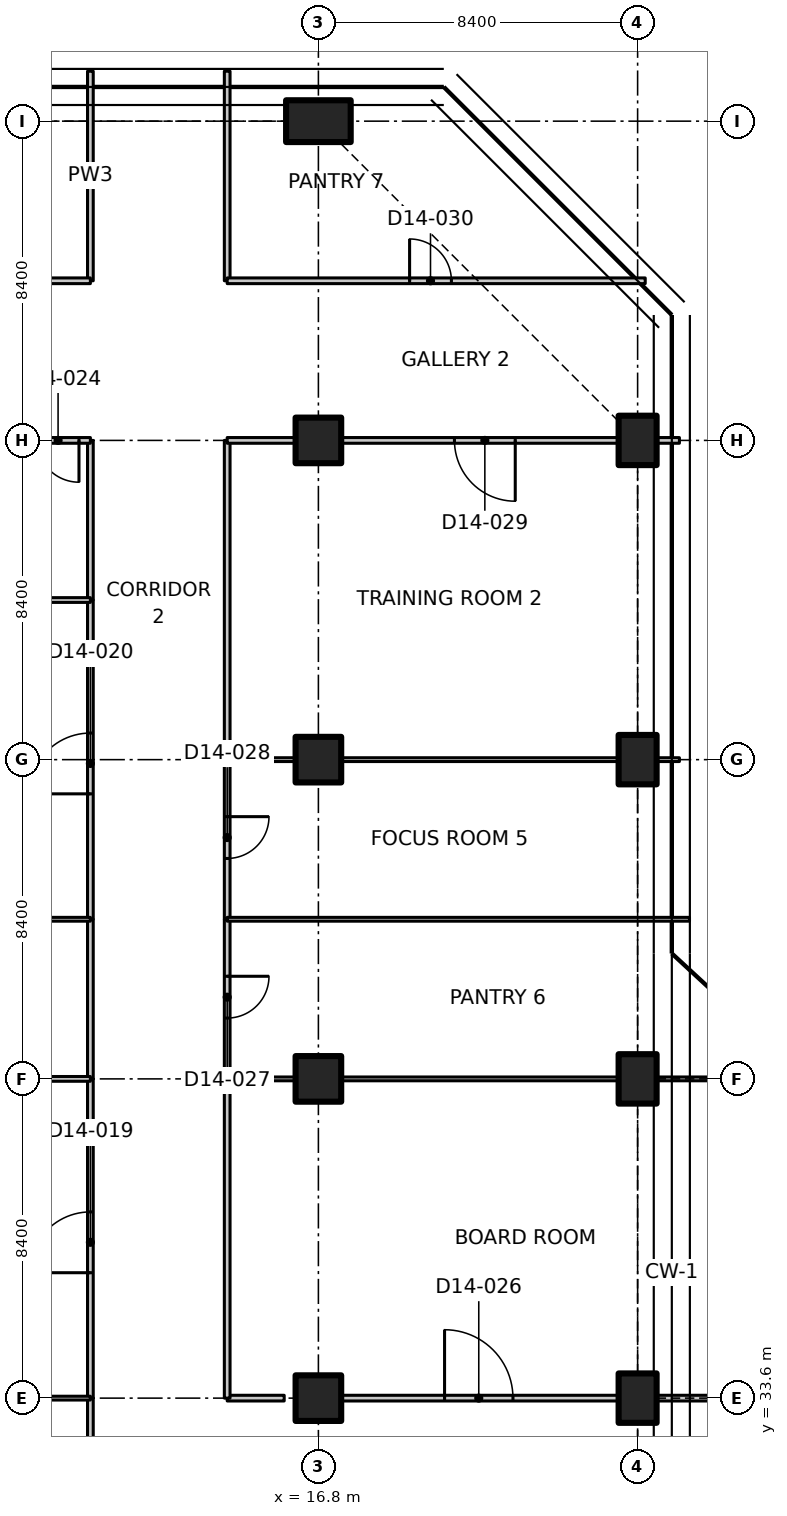
"""IFC4 building model, lengths in metres.
Left out: names, types, materials, properties, quantities, classifications, styles, units other than length and angle.
Written with IfcOpenShell. Run it as: python <this file> out.ifc"""

import sys

from ifc_helpers import new_model, si_unit, direction, frame, frame_2d, origin, origin_2d, place, context, subcontext, project, spatial, polyline, rectangle, outline, extrude, element, fill, save


model = new_model("IFC4")
c1 = context("Model", 3, precision=1e-05, world=origin(), true_north=direction((0.0, 1.0)))
c2 = subcontext(c1, "Body", "Model", "MODEL_VIEW")
j1 = project(units=[si_unit("LENGTHUNIT", "METRE"), si_unit("PLANEANGLEUNIT", "RADIAN")], contexts=[c1])
p1 = place(None, origin())
s1 = spatial("IfcSite", under=j1, at=p1, CompositionType="ELEMENT")
p2 = place(p1, origin())
s2 = spatial("IfcBuilding", under=s1, at=p2, CompositionType="ELEMENT")
p3 = place(p2, frame((0.0, 0.0, 106.1)))
s3 = spatial("IfcBuildingStorey", under=s2, at=p3, CompositionType="ELEMENT", Elevation=106.1)
for number, where, z_axis, x_axis in (
    (1, (16.8, 33.6, 0.0), (0.0, 0.0, 1.0), (1.0, 0.0, 0.0)),
    (2, (16.8, 42.0, 0.0), (0.0, 0.0, 1.0), (1.0, 0.0, 0.0)),
    (3, (16.8, 50.4, 0.0), (0.0, 0.0, 1.0), (1.0, 0.0, 0.0)),
    (4, (16.8, 58.8, 0.0), (0.0, 0.0, 1.0), (1.0, 0.0, 0.0)),
):
    element("IfcColumn", number, at=place(p3, frame(where, z_axis=z_axis, x_axis=x_axis)), inside=s3, PredefinedType="COLUMN", context=c2, shape_type="SweptSolid", body=[
        extrude(rectangle(XDim=1.2, YDim=1.2, at=origin_2d()), origin(), (0.0, 0.0, 1.0), 3.35),
    ])
p4 = place(p3, frame((16.8, 67.2, 0.0), z_axis=(0.0, 0.0, 1.0), x_axis=(0.0, 1.0, 0.0)))
e5 = element("IfcColumn", 5, at=p4, inside=s3, PredefinedType="COLUMN", context=c2, shape_type="SweptSolid", body=[
    extrude(rectangle(XDim=1.1, YDim=1.7, at=origin_2d()), origin(), (0.0, 0.0, 1.0), 3.35),
])
for number, where, z_axis, x_axis in (
    (6, (25.2, 33.6, 0.0), (0.0, 0.0, 1.0), (1.0, 0.0, 0.0)),
    (7, (25.2, 42.0, 0.0), (0.0, 0.0, 1.0), (1.0, 0.0, 0.0)),
    (8, (25.2, 50.4, 0.0), (0.0, 0.0, 1.0), (1.0, 0.0, 0.0)),
    (9, (25.2, 58.8, 0.0), (0.0, 0.0, 1.0), (1.0, 0.0, 0.0)),
):
    element("IfcColumn", number, at=place(p3, frame(where, z_axis=z_axis, x_axis=x_axis)), inside=s3, PredefinedType="COLUMN", context=c2, shape_type="SweptSolid", body=[
        extrude(rectangle(XDim=1.0, YDim=1.3, at=origin_2d()), origin(), (0.0, 0.0, 1.0), 3.35),
    ])
p5 = place(p3, frame((10.8, 25.2, 0.0), z_axis=(0.0, 0.0, 1.0), x_axis=(0.0, 1.0, 0.0)))
e10 = element("IfcWall", 10, at=p5, inside=s3, PredefinedType="PARTITIONING", context=c2, shape_type="SweptSolid", body=[
    extrude(rectangle(XDim=8.4, YDim=0.15, at=frame_2d((4.2, 0.0))), origin(), (0.0, 0.0, 1.0), 3.33),
])
p6 = place(p5, frame((3.3, 0.0, 0.0)))
e11 = element("IfcOpeningElement", 11, at=p6, cuts=e10, PredefinedType="OPENING", context=c2, shape_type="SweptSolid", body=[
    extrude(rectangle(XDim=1.6, YDim=2.1, at=frame_2d((0.8, 1.05))), frame((0.0, 0.085, 0.0), z_axis=(0.0, -1.0, 0.0), x_axis=(1.0, 0.0, 0.0)), (0.0, 0.0, 1.0), 0.17),
])
p7 = place(p3, frame((14.4, 33.6, 0.0), z_axis=(0.0, 0.0, 1.0), x_axis=(1.0, 0.0, 0.0)))
e12 = element("IfcWall", 12, at=p7, inside=s3, PredefinedType="PARTITIONING", context=c2, shape_type="SweptSolid", body=[
    extrude(rectangle(XDim=1.5, YDim=0.15, at=frame_2d((0.75, 0.0))), origin(), (0.0, 0.0, 1.0), 3.33),
])
p8 = place(p3, frame((17.42, 33.6, 0.0), z_axis=(0.0, 0.0, 1.0), x_axis=(1.0, 0.0, 0.0)))
e13 = element("IfcWall", 13, at=p8, inside=s3, PredefinedType="PARTITIONING", context=c2, shape_type="SweptSolid", body=[
    extrude(rectangle(XDim=7.26, YDim=0.15, at=frame_2d((3.63, 0.0))), origin(), (0.0, 0.0, 1.0), 3.33),
])
p9 = place(p8, frame((2.7, 0.0, 0.0)))
e14 = element("IfcOpeningElement", 14, at=p9, cuts=e13, PredefinedType="OPENING", context=c2, shape_type="SweptSolid", body=[
    extrude(rectangle(XDim=1.8, YDim=2.1, at=frame_2d((0.9, 1.05))), frame((0.0, 0.085, 0.0), z_axis=(0.0, -1.0, 0.0), x_axis=(1.0, 0.0, 0.0)), (0.0, 0.0, 1.0), 0.17),
])
p10 = place(p3, frame((25.72, 33.6, 0.0), z_axis=(0.0, 0.0, 1.0), x_axis=(1.0, 0.0, 0.0)))
e15 = element("IfcWall", 15, at=p10, inside=s3, PredefinedType="PARTITIONING", context=c2, shape_type="SweptSolid", body=[
    extrude(rectangle(XDim=4.268, YDim=0.15, at=frame_2d((2.134, 0.0))), origin(), (0.0, 0.0, 1.0), 2.98),
])
p11 = place(p3, frame((10.8, 33.6, 0.0), z_axis=(0.0, 0.0, 1.0), x_axis=(0.0, 1.0, 0.0)))
e16 = element("IfcWall", 16, at=p11, inside=s3, PredefinedType="PARTITIONING", context=c2, shape_type="SweptSolid", body=[
    extrude(rectangle(XDim=8.4, YDim=0.15, at=frame_2d((4.2, 0.0))), origin(), (0.0, 0.0, 1.0), 3.33),
])
p12 = place(p11, frame((3.3, 0.0, 0.0)))
e17 = element("IfcOpeningElement", 17, at=p12, cuts=e16, PredefinedType="OPENING", context=c2, shape_type="SweptSolid", body=[
    extrude(rectangle(XDim=1.6, YDim=2.1, at=frame_2d((0.8, 1.05))), frame((0.0, 0.085, 0.0), z_axis=(0.0, -1.0, 0.0), x_axis=(1.0, 0.0, 0.0)), (0.0, 0.0, 1.0), 0.17),
])
p13 = place(p3, frame((10.8, 46.2, 0.0), z_axis=(0.0, 0.0, 1.0), x_axis=(0.0, 1.0, 0.0)))
e18 = element("IfcWall", 18, at=p13, inside=s3, PredefinedType="PARTITIONING", context=c2, shape_type="SweptSolid", body=[
    extrude(rectangle(XDim=8.4, YDim=0.15, at=frame_2d((4.2, 0.0))), origin(), (0.0, 0.0, 1.0), 3.33),
])
p14 = place(p13, frame((3.3, 0.0, 0.0)))
e19 = element("IfcOpeningElement", 19, at=p14, cuts=e18, PredefinedType="OPENING", context=c2, shape_type="SweptSolid", body=[
    extrude(rectangle(XDim=1.6, YDim=2.1, at=frame_2d((0.8, 1.05))), frame((0.0, 0.085, 0.0), z_axis=(0.0, -1.0, 0.0), x_axis=(1.0, 0.0, 0.0)), (0.0, 0.0, 1.0), 0.17),
])
for number, where, z_axis, x_axis in (
    (20, (10.8, 42.0, 0.0), (0.0, 0.0, 1.0), (0.0, 1.0, 0.0)),
    (21, (10.8, 54.6, 0.0), (0.0, 0.0, 1.0), (0.0, 1.0, 0.0)),
):
    element("IfcWall", number, at=place(p3, frame(where, z_axis=z_axis, x_axis=x_axis)), inside=s3, PredefinedType="PARTITIONING", context=c2, shape_type="SweptSolid", body=[
        extrude(rectangle(XDim=4.2, YDim=0.15, at=frame_2d((2.1, 0.0))), origin(), (0.0, 0.0, 1.0), 3.33),
    ])
p15 = place(p3, frame((10.8, 63.0, 0.0), z_axis=(0.0, 0.0, 1.0), x_axis=(0.0, 1.0, 0.0)))
e22 = element("IfcWall", 22, at=p15, inside=s3, PredefinedType="PARTITIONING", context=c2, shape_type="SweptSolid", body=[
    extrude(outline(polyline([(0.0, 0.0), (5.514, 0.0), (5.514, 3.33), (5.28, 3.33), (4.65, 3.33), (4.648, 2.98), (3.752, 2.98), (3.75, 3.33), (0.0, 3.33), (0.0, 0.0)])), frame((0.0, 0.075, 0.0), z_axis=(0.0, -1.0, 0.0), x_axis=(1.0, 0.0, 0.0)), (0.0, 0.0, 1.0), 0.15),
])
p16 = place(p3, frame((14.4, 42.0, 0.0), z_axis=(0.0, 0.0, 1.0), x_axis=(0.0, -1.0, 0.0)))
e23 = element("IfcWall", 23, at=p16, inside=s3, PredefinedType="PARTITIONING", context=c2, shape_type="SweptSolid", body=[
    extrude(rectangle(XDim=8.4, YDim=0.15, at=frame_2d((4.2, 0.0))), origin(), (0.0, 0.0, 1.0), 3.33),
])
p17 = place(p3, frame((14.4, 46.2, 0.0), z_axis=(0.0, 0.0, 1.0), x_axis=(0.0, -1.0, 0.0)))
e24 = element("IfcWall", 24, at=p17, inside=s3, PredefinedType="PARTITIONING", context=c2, shape_type="SweptSolid", body=[
    extrude(rectangle(XDim=4.2, YDim=0.15, at=frame_2d((2.1, 0.0))), origin(), (0.0, 0.0, 1.0), 3.33),
])
p18 = place(p17, frame((1.5, 0.0, 0.0)))
e25 = element("IfcOpeningElement", 25, at=p18, cuts=e24, PredefinedType="OPENING", context=c2, shape_type="SweptSolid", body=[
    extrude(rectangle(XDim=1.1, YDim=2.1, at=frame_2d((0.55, 1.05))), frame((0.0, 0.085, 0.0), z_axis=(0.0, -1.0, 0.0), x_axis=(1.0, 0.0, 0.0)), (0.0, 0.0, 1.0), 0.17),
])
p19 = place(p3, frame((14.4, 50.4, 0.0), z_axis=(0.0, 0.0, 1.0), x_axis=(0.0, -1.0, 0.0)))
e26 = element("IfcWall", 26, at=p19, inside=s3, PredefinedType="PARTITIONING", context=c2, shape_type="SweptSolid", body=[
    extrude(rectangle(XDim=4.2, YDim=0.15, at=frame_2d((2.1, 0.0))), origin(), (0.0, 0.0, 1.0), 3.33),
])
p20 = place(p19, frame((1.5, 0.0, 0.0)))
e27 = element("IfcOpeningElement", 27, at=p20, cuts=e26, PredefinedType="OPENING", context=c2, shape_type="SweptSolid", body=[
    extrude(rectangle(XDim=1.1, YDim=2.1, at=frame_2d((0.55, 1.05))), frame((0.0, 0.085, 0.0), z_axis=(0.0, -1.0, 0.0), x_axis=(1.0, 0.0, 0.0)), (0.0, 0.0, 1.0), 0.17),
])
p21 = place(p3, frame((14.4, 58.8, 0.0), z_axis=(0.0, 0.0, 1.0), x_axis=(0.0, -1.0, 0.0)))
e28 = element("IfcWall", 28, at=p21, inside=s3, PredefinedType="PARTITIONING", context=c2, shape_type="SweptSolid", body=[
    extrude(rectangle(XDim=8.4, YDim=0.15, at=frame_2d((4.2, 0.0))), origin(), (0.0, 0.0, 1.0), 3.33),
])
p22 = place(p3, frame((14.4, 68.514, 0.0), z_axis=(0.0, 0.0, 1.0), x_axis=(0.0, -1.0, 0.0)))
e29 = element("IfcWall", 29, at=p22, inside=s3, PredefinedType="PARTITIONING", context=c2, shape_type="SweptSolid", body=[
    extrude(outline(polyline([(0.0, 0.0), (5.514, 0.0), (5.514, 3.33), (1.764, 3.33), (1.762, 2.98), (0.866, 2.98), (0.864, 3.33), (0.234, 3.33), (0.0, 3.33), (0.0, 0.0)])), frame((0.0, 0.075, 0.0), z_axis=(0.0, -1.0, 0.0), x_axis=(1.0, 0.0, 0.0)), (0.0, 0.0, 1.0), 0.15),
])
p23 = place(p3, frame((10.8, 58.8, 0.0), z_axis=(0.0, 0.0, 1.0), x_axis=(-1.0, 0.0, 0.0)))
e30 = element("IfcWall", 30, at=p23, inside=s3, PredefinedType="PARTITIONING", context=c2, shape_type="SweptSolid", body=[
    extrude(rectangle(XDim=1.78, YDim=0.15, at=frame_2d((0.89, 0.0))), origin(), (0.0, 0.0, 1.0), 3.33),
])
p24 = place(p23, frame((0.3, 0.0, 0.0)))
e31 = element("IfcOpeningElement", 31, at=p24, cuts=e30, PredefinedType="OPENING", context=c2, shape_type="SweptSolid", body=[
    extrude(rectangle(XDim=1.1, YDim=2.1, at=frame_2d((0.55, 1.05))), frame((0.0, 0.085, 0.0), z_axis=(0.0, -1.0, 0.0), x_axis=(1.0, 0.0, 0.0)), (0.0, 0.0, 1.0), 0.17),
])
p25 = place(p3, frame((-0.2, 63.0, 0.0), z_axis=(0.0, 0.0, 1.0), x_axis=(1.0, 0.0, 0.0)))
e32 = element("IfcWall", 32, at=p25, inside=s3, PredefinedType="PARTITIONING", context=c2, shape_type="SweptSolid", body=[
    extrude(outline(polyline([(0.0, 0.0), (11.0, 0.0), (11.0, 3.33), (5.091, 3.33), (5.089, 2.98), (3.711, 2.98), (3.709, 3.33), (0.0, 3.33), (0.0, 0.0)])), frame((0.0, 0.075, 0.0), z_axis=(0.0, -1.0, 0.0), x_axis=(1.0, 0.0, 0.0)), (0.0, 0.0, 1.0), 0.15),
])
p26 = place(p25, frame((5.0, 0.0, 0.0)))
e33 = element("IfcOpeningElement", 33, at=p26, cuts=e32, PredefinedType="OPENING", context=c2, shape_type="SweptSolid", body=[
    extrude(rectangle(XDim=1.1, YDim=2.1, at=frame_2d((0.55, 1.05))), frame((0.0, 0.085, 0.0), z_axis=(0.0, -1.0, 0.0), x_axis=(1.0, 0.0, 0.0)), (0.0, 0.0, 1.0), 0.17),
])
p27 = place(p3, frame((9.02, 33.6, 0.0), z_axis=(0.0, 0.0, 1.0), x_axis=(1.0, 0.0, 0.0)))
e34 = element("IfcWall", 34, at=p27, inside=s3, PredefinedType="PARTITIONING", context=c2, shape_type="SweptSolid", body=[
    extrude(rectangle(XDim=1.78, YDim=0.1, at=frame_2d((0.89, 0.0))), origin(), (0.0, 0.0, 1.0), 3.33),
])
p28 = place(p3, frame((9.02, 42.0, 0.0), z_axis=(0.0, 0.0, 1.0), x_axis=(1.0, 0.0, 0.0)))
e35 = element("IfcWall", 35, at=p28, inside=s3, PredefinedType="PARTITIONING", context=c2, shape_type="SweptSolid", body=[
    extrude(rectangle(XDim=1.78, YDim=0.125, at=frame_2d((0.89, 0.0))), origin(), (0.0, 0.0, 1.0), 3.33),
])
p29 = place(p3, frame((10.8, 46.2, 0.0), z_axis=(0.0, 0.0, 1.0), x_axis=(-1.0, 0.0, 0.0)))
e36 = element("IfcWall", 36, at=p29, inside=s3, PredefinedType="PARTITIONING", context=c2, shape_type="SweptSolid", body=[
    extrude(rectangle(XDim=6.0, YDim=0.1, at=frame_2d((3.0, 0.0))), origin(), (0.0, 0.0, 1.0), 3.33),
])
p30 = place(p29, frame((2.4, 0.0, 0.0)))
e37 = element("IfcOpeningElement", 37, at=p30, cuts=e36, PredefinedType="OPENING", context=c2, shape_type="SweptSolid", body=[
    extrude(rectangle(XDim=1.0, YDim=2.1, at=frame_2d((0.5, 1.05))), frame((0.0, 0.06, 0.0), z_axis=(0.0, -1.0, 0.0), x_axis=(1.0, 0.0, 0.0)), (0.0, 0.0, 1.0), 0.12),
])
p31 = place(p3, frame((-1.365, 54.6, 0.0), z_axis=(0.0, 0.0, 1.0), x_axis=(1.0, 0.0, 0.0)))
e38 = element("IfcWall", 38, at=p31, inside=s3, PredefinedType="PARTITIONING", context=c2, shape_type="SweptSolid", body=[
    extrude(outline(polyline([(0.0, 0.0), (12.165, 0.0), (12.165, 3.33), (1.815, 3.33), (1.813, 2.98), (0.917, 2.98), (0.915, 3.33), (0.265, 3.33), (0.0, 3.33), (0.0, 0.0)])), frame((0.0, 0.062, 0.0), z_axis=(0.0, -1.0, 0.0), x_axis=(1.0, 0.0, 0.0)), (0.0, 0.0, 1.0), 0.125),
])
p32 = place(p3, frame((26.3, 58.8, 0.0), z_axis=(0.0, 0.0, 1.0), x_axis=(-1.0, 0.0, 0.0)))
e39 = element("IfcWall", 39, at=p32, inside=s3, PredefinedType="PARTITIONING", context=c2, shape_type="SweptSolid", body=[
    extrude(rectangle(XDim=0.58, YDim=0.15, at=frame_2d((0.29, 0.0))), origin(), (0.0, 0.0, 1.0), 3.33),
])
p33 = place(p3, frame((24.68, 58.8, 0.0), z_axis=(0.0, 0.0, 1.0), x_axis=(-1.0, 0.0, 0.0)))
e40 = element("IfcWall", 40, at=p33, inside=s3, PredefinedType="PARTITIONING", context=c2, shape_type="SweptSolid", body=[
    extrude(outline(polyline([(0.0, 0.0), (7.26, 0.0), (7.26, 3.33), (0.171, 3.33), (0.169, 2.98), (0.0, 2.98), (0.0, 0.0)])), frame((0.0, 0.075, 0.0), z_axis=(0.0, -1.0, 0.0), x_axis=(1.0, 0.0, 0.0)), (0.0, 0.0, 1.0), 0.15),
])
p34 = place(p33, frame((2.7, 0.0, 0.0)))
e41 = element("IfcOpeningElement", 41, at=p34, cuts=e40, PredefinedType="OPENING", context=c2, shape_type="SweptSolid", body=[
    extrude(rectangle(XDim=1.6, YDim=2.1, at=frame_2d((0.8, 1.05))), frame((0.0, 0.085, 0.0), z_axis=(0.0, -1.0, 0.0), x_axis=(1.0, 0.0, 0.0)), (0.0, 0.0, 1.0), 0.17),
])
p35 = place(p3, frame((16.18, 58.8, 0.0), z_axis=(0.0, 0.0, 1.0), x_axis=(-1.0, 0.0, 0.0)))
e42 = element("IfcWall", 42, at=p35, inside=s3, PredefinedType="PARTITIONING", context=c2, shape_type="SweptSolid", body=[
    extrude(rectangle(XDim=1.78, YDim=0.15, at=frame_2d((0.89, 0.0))), origin(), (0.0, 0.0, 1.0), 3.33),
])
p36 = place(p3, frame((14.4, 63.0, 0.0), z_axis=(0.0, 0.0, 1.0), x_axis=(1.0, 0.0, 0.0)))
e43 = element("IfcWall", 43, at=p36, inside=s3, PredefinedType="PARTITIONING", context=c2, shape_type="SweptSolid", body=[
    extrude(outline(polyline([(0.0, 0.0), (11.0, 0.0), (11.0, 3.33), (7.291, 3.33), (7.289, 2.98), (5.911, 2.98), (5.909, 3.33), (0.0, 3.33), (0.0, 0.0)])), frame((0.0, 0.075, 0.0), z_axis=(0.0, -1.0, 0.0), x_axis=(1.0, 0.0, 0.0)), (0.0, 0.0, 1.0), 0.15),
])
p37 = place(p36, frame((4.8, 0.0, 0.0)))
e44 = element("IfcOpeningElement", 44, at=p37, cuts=e43, PredefinedType="OPENING", context=c2, shape_type="SweptSolid", body=[
    extrude(rectangle(XDim=1.1, YDim=2.1, at=frame_2d((0.55, 1.05))), frame((0.0, 0.085, 0.0), z_axis=(0.0, -1.0, 0.0), x_axis=(1.0, 0.0, 0.0)), (0.0, 0.0, 1.0), 0.17),
])
p38 = place(p3, frame((14.4, 42.0, 0.0), z_axis=(0.0, 0.0, 1.0), x_axis=(1.0, 0.0, 0.0)))
e45 = element("IfcWall", 45, at=p38, inside=s3, PredefinedType="PARTITIONING", context=c2, shape_type="SweptSolid", body=[
    extrude(rectangle(XDim=1.78, YDim=0.1, at=frame_2d((0.89, 0.0))), origin(), (0.0, 0.0, 1.0), 3.33),
])
p39 = place(p3, frame((17.42, 42.0, 0.0), z_axis=(0.0, 0.0, 1.0), x_axis=(1.0, 0.0, 0.0)))
e46 = element("IfcWall", 46, at=p39, inside=s3, PredefinedType="PARTITIONING", context=c2, shape_type="SweptSolid", body=[
    extrude(rectangle(XDim=7.26, YDim=0.1, at=frame_2d((3.63, 0.0))), origin(), (0.0, 0.0, 1.0), 3.33),
])
p40 = place(p3, frame((25.72, 42.0, 0.0), z_axis=(0.0, 0.0, 1.0), x_axis=(1.0, 0.0, 0.0)))
e47 = element("IfcWall", 47, at=p40, inside=s3, PredefinedType="PARTITIONING", context=c2, shape_type="SweptSolid", body=[
    extrude(rectangle(XDim=3.292, YDim=0.1, at=frame_2d((1.646, 0.0))), origin(), (0.0, 0.0, 1.0), 2.98),
])
p41 = place(p3, frame((14.4, 46.2, 0.0), z_axis=(0.0, 0.0, 1.0), x_axis=(1.0, 0.0, 0.0)))
e48 = element("IfcWall", 48, at=p41, inside=s3, PredefinedType="PARTITIONING", context=c2, shape_type="SweptSolid", body=[
    extrude(outline(polyline([(0.0, 0.0), (12.165, 0.0), (12.165, 3.33), (11.9, 3.33), (11.25, 3.33), (11.248, 2.98), (10.352, 2.98), (10.35, 3.33), (0.0, 3.33), (0.0, 0.0)])), frame((0.0, 0.05, 0.0), z_axis=(0.0, -1.0, 0.0), x_axis=(1.0, 0.0, 0.0)), (0.0, 0.0, 1.0), 0.1),
])
p42 = place(p3, frame((14.4, 50.4, 0.0), z_axis=(0.0, 0.0, 1.0), x_axis=(1.0, 0.0, 0.0)))
e49 = element("IfcWall", 49, at=p42, inside=s3, PredefinedType="PARTITIONING", context=c2, shape_type="SweptSolid", body=[
    extrude(rectangle(XDim=1.78, YDim=0.1, at=frame_2d((0.89, 0.0))), origin(), (0.0, 0.0, 1.0), 3.33),
])
p43 = place(p3, frame((17.42, 50.4, 0.0), z_axis=(0.0, 0.0, 1.0), x_axis=(1.0, 0.0, 0.0)))
e50 = element("IfcWall", 50, at=p43, inside=s3, PredefinedType="PARTITIONING", context=c2, shape_type="SweptSolid", body=[
    extrude(rectangle(XDim=7.26, YDim=0.1, at=frame_2d((3.63, 0.0))), origin(), (0.0, 0.0, 1.0), 3.33),
])
p44 = place(p3, frame((25.72, 50.4, 0.0), z_axis=(0.0, 0.0, 1.0), x_axis=(1.0, 0.0, 0.0)))
e51 = element("IfcWall", 51, at=p44, inside=s3, PredefinedType="PARTITIONING", context=c2, shape_type="SweptSolid", body=[
    extrude(rectangle(XDim=0.58, YDim=0.1, at=frame_2d((0.29, 0.0))), origin(), (0.0, 0.0, 1.0), 3.33),
])
p45 = place(p12, origin())
e52 = element("IfcDoor", 52, at=p45, inside=s3, OperationType="DOUBLE_DOOR_SINGLE_SWING", PredefinedType="DOOR", context=c2, shape_type="SweptSolid", body=[
    extrude(rectangle(XDim=1.6, YDim=2.1, at=frame_2d((0.8, 1.05))), frame((0.0, 0.025, 0.0), z_axis=(0.0, -1.0, 0.0), x_axis=(1.0, 0.0, 0.0)), (0.0, 0.0, 1.0), 0.05),
])
fill(e17, e52)
p46 = place(p14, origin())
e53 = element("IfcDoor", 53, at=p46, inside=s3, OperationType="DOUBLE_DOOR_SINGLE_SWING", PredefinedType="DOOR", context=c2, shape_type="SweptSolid", body=[
    extrude(rectangle(XDim=1.6, YDim=2.1, at=frame_2d((0.8, 1.05))), frame((0.0, 0.025, 0.0), z_axis=(0.0, -1.0, 0.0), x_axis=(1.0, 0.0, 0.0)), (0.0, 0.0, 1.0), 0.05),
])
fill(e19, e53)
p47 = place(p24, origin())
e54 = element("IfcDoor", 54, at=p47, inside=s3, OperationType="SINGLE_SWING_LEFT", PredefinedType="DOOR", context=c2, shape_type="SweptSolid", body=[
    extrude(rectangle(XDim=1.1, YDim=2.1, at=frame_2d((0.55, 1.05))), frame((0.0, 0.025, 0.0), z_axis=(0.0, -1.0, 0.0), x_axis=(1.0, 0.0, 0.0)), (0.0, 0.0, 1.0), 0.05),
])
fill(e31, e54)
p48 = place(p9, origin())
e55 = element("IfcDoor", 55, at=p48, inside=s3, OperationType="DOUBLE_DOOR_SINGLE_SWING", PredefinedType="DOOR", context=c2, shape_type="SweptSolid", body=[
    extrude(rectangle(XDim=1.8, YDim=2.1, at=frame_2d((0.9, 1.05))), frame((0.0, 0.025, 0.0), z_axis=(0.0, -1.0, 0.0), x_axis=(1.0, 0.0, 0.0)), (0.0, 0.0, 1.0), 0.05),
])
fill(e14, e55)
p49 = place(p18, origin())
e56 = element("IfcDoor", 56, at=p49, inside=s3, OperationType="SINGLE_SWING_LEFT", PredefinedType="DOOR", context=c2, shape_type="SweptSolid", body=[
    extrude(rectangle(XDim=1.1, YDim=2.1, at=frame_2d((0.55, 1.05))), frame((0.0, 0.025, 0.0), z_axis=(0.0, -1.0, 0.0), x_axis=(1.0, 0.0, 0.0)), (0.0, 0.0, 1.0), 0.05),
])
fill(e25, e56)
p50 = place(p20, origin())
e57 = element("IfcDoor", 57, at=p50, inside=s3, OperationType="SINGLE_SWING_LEFT", PredefinedType="DOOR", context=c2, shape_type="SweptSolid", body=[
    extrude(rectangle(XDim=1.1, YDim=2.1, at=frame_2d((0.55, 1.05))), frame((0.0, 0.025, 0.0), z_axis=(0.0, -1.0, 0.0), x_axis=(1.0, 0.0, 0.0)), (0.0, 0.0, 1.0), 0.05),
])
fill(e27, e57)
p51 = place(p34, origin())
e58 = element("IfcDoor", 58, at=p51, inside=s3, OperationType="DOUBLE_DOOR_SINGLE_SWING", PredefinedType="DOOR", context=c2, shape_type="SweptSolid", body=[
    extrude(rectangle(XDim=1.6, YDim=2.1, at=frame_2d((0.8, 1.05))), frame((0.0, 0.025, 0.0), z_axis=(0.0, -1.0, 0.0), x_axis=(1.0, 0.0, 0.0)), (0.0, 0.0, 1.0), 0.05),
])
fill(e41, e58)
p52 = place(p37, origin())
e59 = element("IfcDoor", 59, at=p52, inside=s3, OperationType="SINGLE_SWING_LEFT", PredefinedType="DOOR", context=c2, shape_type="SweptSolid", body=[
    extrude(rectangle(XDim=1.1, YDim=2.1, at=frame_2d((0.55, 1.05))), frame((0.0, 0.025, 0.0), z_axis=(0.0, -1.0, 0.0), x_axis=(1.0, 0.0, 0.0)), (0.0, 0.0, 1.0), 0.05),
])
fill(e44, e59)
save(model, sys.argv[1])
